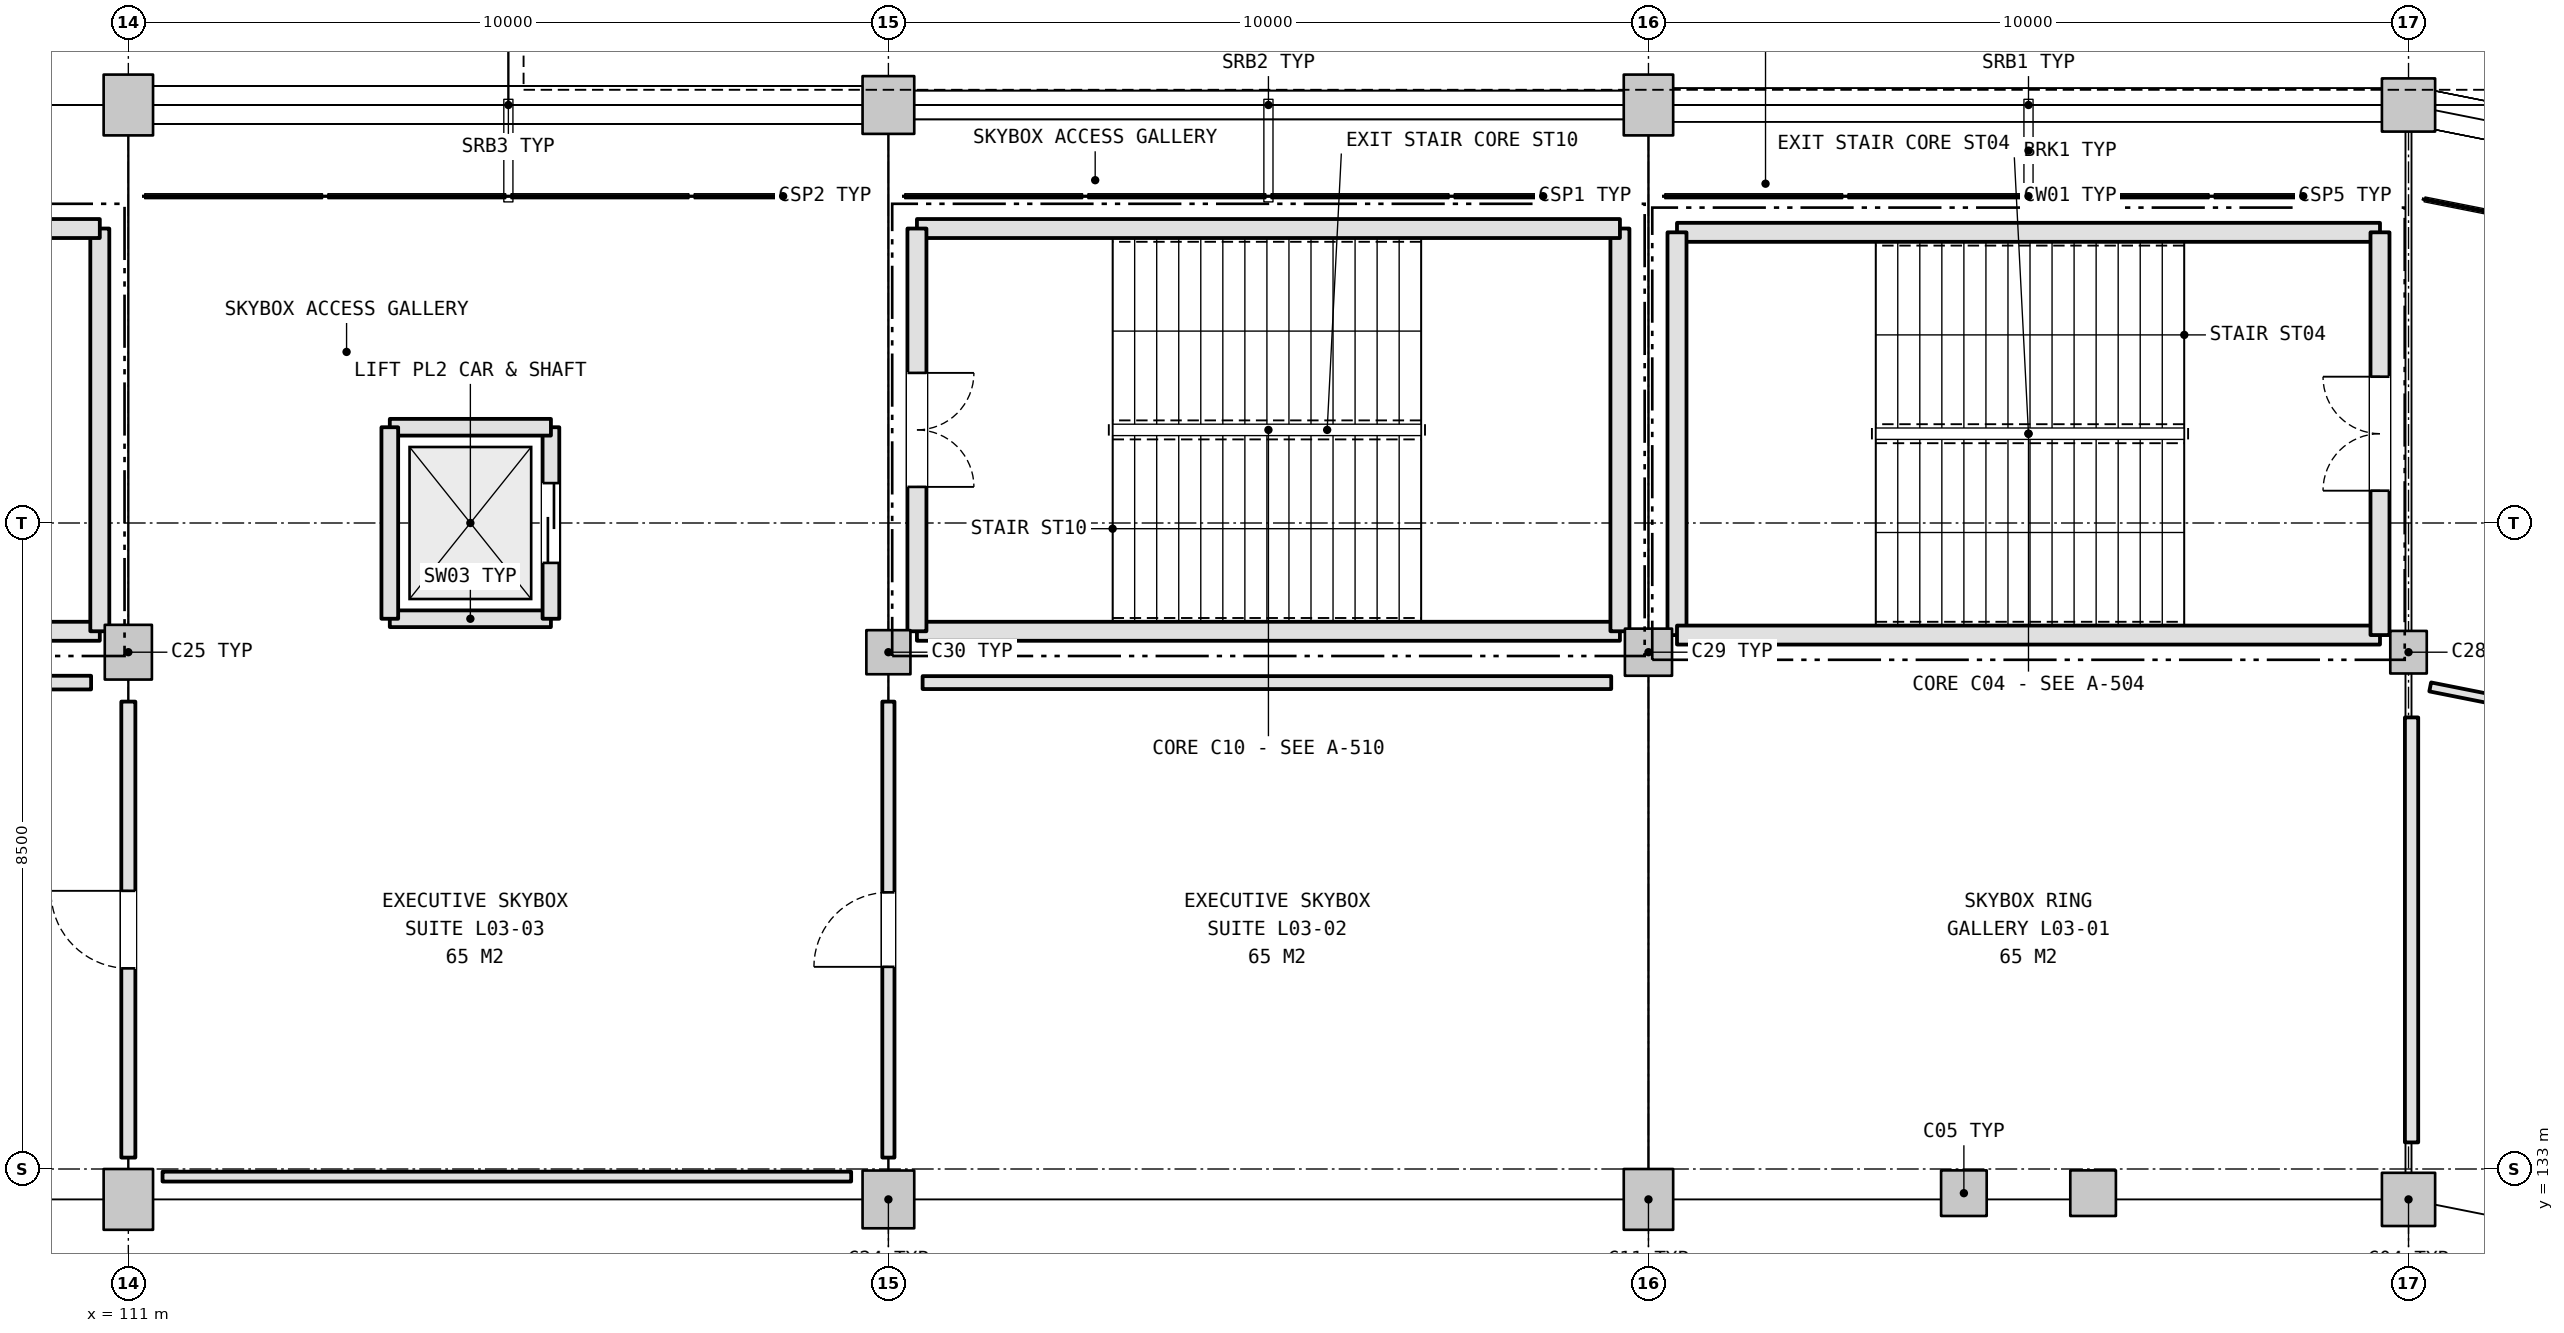
"""IFC4 building model, lengths in metres.
Left out: names, types, materials, properties, quantities, classifications, styles, units other than length and angle.
Written with IfcOpenShell. Run it as: python <this file> out.ifc"""

import sys

from ifc_helpers import new_model, si_unit, direction, frame, frame_2d, origin, origin_2d, place, context, subcontext, project, spatial, rectangle, extrude, element, fill, save


model = new_model("IFC4")
c1 = context("Model", 3, precision=1e-05, world=origin(), true_north=direction((0.0, 1.0)))
c2 = subcontext(c1, "Body", "Model", "MODEL_VIEW")
j1 = project(units=[si_unit("LENGTHUNIT", "METRE"), si_unit("PLANEANGLEUNIT", "RADIAN")], contexts=[c1])
p1 = place(None, origin())
s1 = spatial("IfcSite", under=j1, at=p1, CompositionType="ELEMENT")
p2 = place(p1, origin())
s2 = spatial("IfcBuilding", under=s1, at=p2, CompositionType="ELEMENT")
p3 = place(p2, frame((0.0, 0.0, 16.2)))
s3 = spatial("IfcBuildingStorey", under=s2, at=p3, CompositionType="ELEMENT", Elevation=16.2)
p4 = place(p3, frame((141.0, 132.6, 0.0), z_axis=(0.0, 0.0, 1.0), x_axis=(1.0, 0.0, 0.0)))
e1 = element("IfcColumn", 1, at=p4, inside=s3, PredefinedType="COLUMN", context=c2, shape_type="SweptSolid", body=[
    extrude(rectangle(XDim=0.7, YDim=0.7, at=origin_2d()), origin(), (0.0, 0.0, 1.0), 5.4),
])
p5 = place(p3, frame((141.0, 139.8, 0.0), z_axis=(0.0, 0.0, 1.0), x_axis=(1.0, 0.0, 0.0)))
e2 = element("IfcColumn", 2, at=p5, inside=s3, PredefinedType="COLUMN", context=c2, shape_type="SweptSolid", body=[
    extrude(rectangle(XDim=0.48, YDim=0.56, at=origin_2d()), origin(), (0.0, 0.0, 1.0), 5.4),
])
p6 = place(p3, frame((141.0, 147.0, 0.0), z_axis=(0.0, 0.0, 1.0), x_axis=(1.0, 0.0, 0.0)))
e3 = element("IfcColumn", 3, at=p6, inside=s3, PredefinedType="COLUMN", context=c2, shape_type="SweptSolid", body=[
    extrude(rectangle(XDim=0.7, YDim=0.7, at=origin_2d()), origin(), (0.0, 0.0, 1.0), 5.4),
])
p7 = place(p3, frame((131.0, 132.6, 0.0), z_axis=(0.0, 0.0, 1.0), x_axis=(1.0, 0.0, 0.0)))
e4 = element("IfcColumn", 4, at=p7, inside=s3, PredefinedType="COLUMN", context=c2, shape_type="SweptSolid", body=[
    extrude(rectangle(XDim=0.65, YDim=0.8, at=origin_2d()), origin(), (0.0, 0.0, 1.0), 5.4),
])
p8 = place(p3, frame((131.0, 139.8, 0.0), z_axis=(0.0, 0.0, 1.0), x_axis=(1.0, 0.0, 0.0)))
e5 = element("IfcColumn", 5, at=p8, inside=s3, PredefinedType="COLUMN", context=c2, shape_type="SweptSolid", body=[
    extrude(rectangle(XDim=0.62, YDim=0.62, at=origin_2d()), origin(), (0.0, 0.0, 1.0), 5.4),
])
p9 = place(p3, frame((131.0, 147.0, 0.0), z_axis=(0.0, 0.0, 1.0), x_axis=(1.0, 0.0, 0.0)))
e6 = element("IfcColumn", 6, at=p9, inside=s3, PredefinedType="COLUMN", context=c2, shape_type="SweptSolid", body=[
    extrude(rectangle(XDim=0.65, YDim=0.8, at=origin_2d()), origin(), (0.0, 0.0, 1.0), 5.4),
])
p10 = place(p3, frame((121.0, 132.6, 0.0), z_axis=(0.0, 0.0, 1.0), x_axis=(1.0, 0.0, 0.0)))
e7 = element("IfcColumn", 7, at=p10, inside=s3, PredefinedType="COLUMN", context=c2, shape_type="SweptSolid", body=[
    extrude(rectangle(XDim=0.68, YDim=0.76, at=origin_2d()), origin(), (0.0, 0.0, 1.0), 5.4),
])
p11 = place(p3, frame((121.0, 139.8, 0.0), z_axis=(0.0, 0.0, 1.0), x_axis=(1.0, 0.0, 0.0)))
e8 = element("IfcColumn", 8, at=p11, inside=s3, PredefinedType="COLUMN", context=c2, shape_type="SweptSolid", body=[
    extrude(rectangle(XDim=0.58, YDim=0.58, at=origin_2d()), origin(), (0.0, 0.0, 1.0), 5.4),
])
p12 = place(p3, frame((121.0, 147.0, 0.0), z_axis=(0.0, 0.0, 1.0), x_axis=(1.0, 0.0, 0.0)))
e9 = element("IfcColumn", 9, at=p12, inside=s3, PredefinedType="COLUMN", context=c2, shape_type="SweptSolid", body=[
    extrude(rectangle(XDim=0.68, YDim=0.76, at=origin_2d()), origin(), (0.0, 0.0, 1.0), 5.4),
])
p13 = place(p3, frame((111.0, 132.6, 0.0), z_axis=(0.0, 0.0, 1.0), x_axis=(1.0, 0.0, 0.0)))
e10 = element("IfcColumn", 10, at=p13, inside=s3, PredefinedType="COLUMN", context=c2, shape_type="SweptSolid", body=[
    extrude(rectangle(XDim=0.65, YDim=0.8, at=origin_2d()), origin(), (0.0, 0.0, 1.0), 5.4),
])
p14 = place(p3, frame((111.0, 139.8, 0.0), z_axis=(0.0, 0.0, 1.0), x_axis=(1.0, 0.0, 0.0)))
e11 = element("IfcColumn", 11, at=p14, inside=s3, PredefinedType="COLUMN", context=c2, shape_type="SweptSolid", body=[
    extrude(rectangle(XDim=0.62, YDim=0.72, at=origin_2d()), origin(), (0.0, 0.0, 1.0), 5.4),
])
p15 = place(p3, frame((111.0, 147.0, 0.0), z_axis=(0.0, 0.0, 1.0), x_axis=(1.0, 0.0, 0.0)))
e12 = element("IfcColumn", 12, at=p15, inside=s3, PredefinedType="COLUMN", context=c2, shape_type="SweptSolid", body=[
    extrude(rectangle(XDim=0.65, YDim=0.8, at=origin_2d()), origin(), (0.0, 0.0, 1.0), 5.4),
])
p16 = place(p3, frame((140.625, 145.325, 0.0), z_axis=(0.0, 0.0, 1.0), x_axis=(-1.0, 0.0, 0.0)))
e13 = element("IfcWall", 13, at=p16, inside=s3, PredefinedType="SHEAR", context=c2, shape_type="SweptSolid", body=[
    extrude(rectangle(XDim=9.249, YDim=0.25, at=frame_2d((4.625, 0.0))), origin(), (0.0, 0.0, 1.0), 5.14),
])
p17 = place(p3, frame((131.375, 145.325, 0.0), z_axis=(0.0, 0.0, 1.0), x_axis=(0.0, -1.0, 0.0)))
e14 = element("IfcWall", 14, at=p17, inside=s3, PredefinedType="SHEAR", context=c2, shape_type="SweptSolid", body=[
    extrude(rectangle(XDim=5.299, YDim=0.25, at=frame_2d((2.65, 0.0))), origin(), (0.0, 0.0, 1.0), 5.14),
])
p18 = place(p3, frame((131.375, 140.025, 0.0), z_axis=(0.0, 0.0, 1.0), x_axis=(1.0, 0.0, 0.0)))
e15 = element("IfcWall", 15, at=p18, inside=s3, PredefinedType="SHEAR", context=c2, shape_type="SweptSolid", body=[
    extrude(rectangle(XDim=9.249, YDim=0.25, at=frame_2d((4.625, 0.0))), origin(), (0.0, 0.0, 1.0), 5.14),
])
p19 = place(p3, frame((140.625, 140.025, 0.0), z_axis=(0.0, 0.0, 1.0), x_axis=(0.0, 1.0, 0.0)))
e16 = element("IfcWall", 16, at=p19, inside=s3, PredefinedType="SHEAR", context=c2, shape_type="SweptSolid", body=[
    extrude(rectangle(XDim=5.299, YDim=0.25, at=frame_2d((2.65, 0.0))), origin(), (0.0, 0.0, 1.0), 5.14),
])
p20 = place(p19, frame((1.9, 0.0, 0.0)))
e17 = element("IfcOpeningElement", 17, at=p20, cuts=e16, PredefinedType="OPENING", context=c2, shape_type="SweptSolid", body=[
    extrude(rectangle(XDim=1.5, YDim=2.2, at=frame_2d((0.75, 1.1))), frame((0.0, 0.135, 0.0), z_axis=(0.0, -1.0, 0.0), x_axis=(1.0, 0.0, 0.0)), (0.0, 0.0, 1.0), 0.27),
])
p21 = place(p3, frame((121.375, 140.075, 0.0), z_axis=(0.0, 0.0, 1.0), x_axis=(1.0, 0.0, 0.0)))
e18 = element("IfcWall", 18, at=p21, inside=s3, PredefinedType="SHEAR", context=c2, shape_type="SweptSolid", body=[
    extrude(rectangle(XDim=9.249, YDim=0.25, at=frame_2d((4.625, 0.0))), origin(), (0.0, 0.0, 1.0), 5.14),
])
p22 = place(p3, frame((130.625, 140.075, 0.0), z_axis=(0.0, 0.0, 1.0), x_axis=(0.0, 1.0, 0.0)))
e19 = element("IfcWall", 19, at=p22, inside=s3, PredefinedType="SHEAR", context=c2, shape_type="SweptSolid", body=[
    extrude(rectangle(XDim=5.299, YDim=0.25, at=frame_2d((2.649, 0.0))), origin(), (0.0, 0.0, 1.0), 5.14),
])
p23 = place(p3, frame((130.625, 145.375, 0.0), z_axis=(0.0, 0.0, 1.0), x_axis=(-1.0, 0.0, 0.0)))
e20 = element("IfcWall", 20, at=p23, inside=s3, PredefinedType="SHEAR", context=c2, shape_type="SweptSolid", body=[
    extrude(rectangle(XDim=9.249, YDim=0.25, at=frame_2d((4.625, 0.0))), origin(), (0.0, 0.0, 1.0), 5.14),
])
p24 = place(p3, frame((121.375, 145.375, 0.0), z_axis=(0.0, 0.0, 1.0), x_axis=(0.0, -1.0, 0.0)))
e21 = element("IfcWall", 21, at=p24, inside=s3, PredefinedType="SHEAR", context=c2, shape_type="SweptSolid", body=[
    extrude(rectangle(XDim=5.299, YDim=0.25, at=frame_2d((2.649, 0.0))), origin(), (0.0, 0.0, 1.0), 5.14),
])
p25 = place(p24, frame((1.9, 0.0, 0.0)))
e22 = element("IfcOpeningElement", 22, at=p25, cuts=e21, PredefinedType="OPENING", context=c2, shape_type="SweptSolid", body=[
    extrude(rectangle(XDim=1.5, YDim=2.2, at=frame_2d((0.75, 1.1))), frame((0.0, 0.135, 0.0), z_axis=(0.0, -1.0, 0.0), x_axis=(1.0, 0.0, 0.0)), (0.0, 0.0, 1.0), 0.27),
])
p26 = place(p3, frame((101.375, 140.075, 0.0), z_axis=(0.0, 0.0, 1.0), x_axis=(1.0, 0.0, 0.0)))
e23 = element("IfcWall", 23, at=p26, inside=s3, PredefinedType="SHEAR", context=c2, shape_type="SweptSolid", body=[
    extrude(rectangle(XDim=9.249, YDim=0.25, at=frame_2d((4.625, 0.0))), origin(), (0.0, 0.0, 1.0), 5.14),
])
p27 = place(p3, frame((110.625, 140.075, 0.0), z_axis=(0.0, 0.0, 1.0), x_axis=(0.0, 1.0, 0.0)))
e24 = element("IfcWall", 24, at=p27, inside=s3, PredefinedType="SHEAR", context=c2, shape_type="SweptSolid", body=[
    extrude(rectangle(XDim=5.299, YDim=0.25, at=frame_2d((2.649, 0.0))), origin(), (0.0, 0.0, 1.0), 5.14),
])
p28 = place(p3, frame((110.625, 145.375, 0.0), z_axis=(0.0, 0.0, 1.0), x_axis=(-1.0, 0.0, 0.0)))
e25 = element("IfcWall", 25, at=p28, inside=s3, PredefinedType="SHEAR", context=c2, shape_type="SweptSolid", body=[
    extrude(rectangle(XDim=9.249, YDim=0.25, at=frame_2d((4.625, 0.0))), origin(), (0.0, 0.0, 1.0), 5.14),
])
for number, where, z_axis, x_axis in (
    (26, (135.15, 132.682, 0.0), (0.0, 0.0, 1.0), (1.0, 0.0, 0.0)),
    (27, (136.85, 132.682, 0.0), (0.0, 0.0, 1.0), (1.0, 0.0, 0.0)),
):
    element("IfcColumn", number, at=place(p3, frame(where, z_axis=z_axis, x_axis=x_axis)), inside=s3, PredefinedType="COLUMN", context=c2, shape_type="SweptSolid", body=[
        extrude(rectangle(XDim=0.6, YDim=0.6, at=origin_2d()), origin(), (0.0, 0.0, 1.0), 5.4),
    ])
p29 = place(p3, frame((114.44, 140.24, 0.0), z_axis=(0.0, 0.0, 1.0), x_axis=(1.0, 0.0, 0.0)))
e28 = element("IfcWall", 28, at=p29, inside=s3, PredefinedType="SHEAR", context=c2, shape_type="SweptSolid", body=[
    extrude(rectangle(XDim=2.12, YDim=0.22, at=frame_2d((1.06, 0.0))), origin(), (0.0, 0.0, 1.0), 5.14),
])
p30 = place(p3, frame((116.56, 140.24, 0.0), z_axis=(0.0, 0.0, 1.0), x_axis=(0.0, 1.0, 0.0)))
e29 = element("IfcWall", 29, at=p30, inside=s3, PredefinedType="SHEAR", context=c2, shape_type="SweptSolid", body=[
    extrude(rectangle(XDim=2.52, YDim=0.22, at=frame_2d((1.26, 0.0))), origin(), (0.0, 0.0, 1.0), 5.14),
])
p31 = place(p30, frame((0.735, 0.0, 0.0)))
e30 = element("IfcOpeningElement", 30, at=p31, cuts=e29, PredefinedType="OPENING", context=c2, shape_type="SweptSolid", body=[
    extrude(rectangle(XDim=1.05, YDim=2.15, at=frame_2d((0.525, 1.075))), frame((0.0, 0.12, 0.0), z_axis=(0.0, -1.0, 0.0), x_axis=(1.0, 0.0, 0.0)), (0.0, 0.0, 1.0), 0.24),
])
p32 = place(p3, frame((116.56, 142.76, 0.0), z_axis=(0.0, 0.0, 1.0), x_axis=(-1.0, 0.0, 0.0)))
e31 = element("IfcWall", 31, at=p32, inside=s3, PredefinedType="SHEAR", context=c2, shape_type="SweptSolid", body=[
    extrude(rectangle(XDim=2.12, YDim=0.22, at=frame_2d((1.06, 0.0))), origin(), (0.0, 0.0, 1.0), 5.14),
])
p33 = place(p3, frame((114.44, 142.76, 0.0), z_axis=(0.0, 0.0, 1.0), x_axis=(0.0, -1.0, 0.0)))
e32 = element("IfcWall", 32, at=p33, inside=s3, PredefinedType="SHEAR", context=c2, shape_type="SweptSolid", body=[
    extrude(rectangle(XDim=2.52, YDim=0.22, at=frame_2d((1.26, 0.0))), origin(), (0.0, 0.0, 1.0), 5.14),
])
p34 = place(p3, frame((121.0, 133.15, 0.0), z_axis=(0.0, 0.0, 1.0), x_axis=(0.0, 1.0, 0.0)))
e33 = element("IfcWall", 33, at=p34, inside=s3, PredefinedType="PARTITIONING", context=c2, shape_type="SweptSolid", body=[
    extrude(rectangle(XDim=6.0, YDim=0.16, at=frame_2d((3.0, 0.0))), origin(), (0.0, 0.0, 1.0), 4.375),
])
p35 = place(p34, frame((2.51, 0.0, 0.0)))
e34 = element("IfcOpeningElement", 34, at=p35, cuts=e33, PredefinedType="OPENING", context=c2, shape_type="SweptSolid", body=[
    extrude(rectangle(XDim=0.98, YDim=2.15, at=frame_2d((0.49, 1.075))), frame((0.0, 0.09, 0.0), z_axis=(0.0, -1.0, 0.0), x_axis=(1.0, 0.0, 0.0)), (0.0, 0.0, 1.0), 0.18),
])
p36 = place(p3, frame((121.45, 139.4, 0.0), z_axis=(0.0, 0.0, 1.0), x_axis=(1.0, 0.0, 0.0)))
e35 = element("IfcWall", 35, at=p36, inside=s3, PredefinedType="PARTITIONING", context=c2, shape_type="SweptSolid", body=[
    extrude(rectangle(XDim=9.06, YDim=0.17, at=frame_2d((4.53, 0.0))), origin(), (0.0, 0.0, 1.0), 5.12),
])
p37 = place(p3, frame((111.0, 133.15, 0.0), z_axis=(0.0, 0.0, 1.0), x_axis=(0.0, 1.0, 0.0)))
e36 = element("IfcWall", 36, at=p37, inside=s3, PredefinedType="PARTITIONING", context=c2, shape_type="SweptSolid", body=[
    extrude(rectangle(XDim=6.0, YDim=0.185, at=frame_2d((3.0, 0.0))), origin(), (0.0, 0.0, 1.0), 4.365),
])
p38 = place(p37, frame((2.49, 0.0, 0.0)))
e37 = element("IfcOpeningElement", 37, at=p38, cuts=e36, PredefinedType="OPENING", context=c2, shape_type="SweptSolid", body=[
    extrude(rectangle(XDim=1.02, YDim=2.15, at=frame_2d((0.51, 1.075))), frame((0.0, 0.103, 0.0), z_axis=(0.0, -1.0, 0.0), x_axis=(1.0, 0.0, 0.0)), (0.0, 0.0, 1.0), 0.205),
])
p39 = place(p3, frame((120.51, 132.9, 0.0), z_axis=(0.0, 0.0, 1.0), x_axis=(-1.0, 0.0, 0.0)))
e38 = element("IfcWall", 38, at=p39, inside=s3, PredefinedType="PARTITIONING", context=c2, shape_type="SweptSolid", body=[
    extrude(rectangle(XDim=9.06, YDim=0.13, at=frame_2d((4.53, 0.0))), origin(), (0.0, 0.0, 1.0), 4.505),
])
p40 = place(p3, frame((101.45, 139.4, 0.0), z_axis=(0.0, 0.0, 1.0), x_axis=(1.0, 0.0, 0.0)))
e39 = element("IfcWall", 39, at=p40, inside=s3, PredefinedType="PARTITIONING", context=c2, shape_type="SweptSolid", body=[
    extrude(rectangle(XDim=9.06, YDim=0.18, at=frame_2d((4.53, 0.0))), origin(), (0.0, 0.0, 1.0), 5.12),
])
p41 = place(p3, frame((141.285, 139.343, 0.0), z_axis=(0.0, 0.0, 1.0), x_axis=(0.980784295226, -0.195095274771, 0.0)))
e40 = element("IfcWall", 40, at=p41, inside=s3, PredefinedType="PARTITIONING", context=c2, shape_type="SweptSolid", body=[
    extrude(rectangle(XDim=16.742, YDim=0.12, at=frame_2d((8.371, 0.0))), origin(), (0.0, 0.0, 1.0), 4.305),
])
p42 = place(p41, frame((7.596, 0.0, 0.0)))
e41 = element("IfcOpeningElement", 41, at=p42, cuts=e40, PredefinedType="OPENING", context=c2, shape_type="SweptSolid", body=[
    extrude(rectangle(XDim=1.55, YDim=2.15, at=frame_2d((0.775, 1.075))), frame((0.0, 0.07, 0.0), z_axis=(0.0, -1.0, 0.0), x_axis=(1.0, 0.0, 0.0)), (0.0, 0.0, 1.0), 0.14),
])
p43 = place(p3, frame((141.04, 133.35, 0.0), z_axis=(0.0, 0.0, 1.0), x_axis=(0.0, 1.0, 0.0)))
e42 = element("IfcWall", 42, at=p43, inside=s3, PredefinedType="PARTITIONING", context=c2, shape_type="SweptSolid", body=[
    extrude(rectangle(XDim=5.592, YDim=0.175, at=frame_2d((2.796, 0.0))), origin(), (0.0, 0.0, 1.0), 4.305),
])
p44 = place(p20, origin())
e43 = element("IfcDoor", 43, at=p44, inside=s3, OperationType="DOUBLE_DOOR_SINGLE_SWING", PredefinedType="DOOR", context=c2, shape_type="SweptSolid", body=[
    extrude(rectangle(XDim=1.5, YDim=2.2, at=frame_2d((0.75, 1.1))), frame((0.0, 0.025, 0.0), z_axis=(0.0, -1.0, 0.0), x_axis=(1.0, 0.0, 0.0)), (0.0, 0.0, 1.0), 0.05),
])
fill(e17, e43)
p45 = place(p25, origin())
e44 = element("IfcDoor", 44, at=p45, inside=s3, OperationType="DOUBLE_DOOR_SINGLE_SWING", PredefinedType="DOOR", context=c2, shape_type="SweptSolid", body=[
    extrude(rectangle(XDim=1.5, YDim=2.2, at=frame_2d((0.75, 1.1))), frame((0.0, 0.025, 0.0), z_axis=(0.0, -1.0, 0.0), x_axis=(1.0, 0.0, 0.0)), (0.0, 0.0, 1.0), 0.05),
])
fill(e22, e44)
p46 = place(p31, origin())
e45 = element("IfcDoor", 45, at=p46, inside=s3, OperationType="DOUBLE_DOOR_SLIDING", PredefinedType="DOOR", context=c2, shape_type="SweptSolid", body=[
    extrude(rectangle(XDim=1.05, YDim=2.15, at=frame_2d((0.525, 1.075))), frame((0.0, 0.025, 0.0), z_axis=(0.0, -1.0, 0.0), x_axis=(1.0, 0.0, 0.0)), (0.0, 0.0, 1.0), 0.05),
])
fill(e30, e45)
p47 = place(p35, origin())
e46 = element("IfcDoor", 46, at=p47, inside=s3, OperationType="SINGLE_SWING_LEFT", PredefinedType="DOOR", context=c2, shape_type="SweptSolid", body=[
    extrude(rectangle(XDim=0.98, YDim=2.15, at=frame_2d((0.49, 1.075))), frame((0.0, 0.025, 0.0), z_axis=(0.0, -1.0, 0.0), x_axis=(1.0, 0.0, 0.0)), (0.0, 0.0, 1.0), 0.05),
])
fill(e34, e46)
p48 = place(p38, origin())
e47 = element("IfcDoor", 47, at=p48, inside=s3, OperationType="SINGLE_SWING_RIGHT", PredefinedType="DOOR", context=c2, shape_type="SweptSolid", body=[
    extrude(rectangle(XDim=1.02, YDim=2.15, at=frame_2d((0.51, 1.075))), frame((0.0, 0.025, 0.0), z_axis=(0.0, -1.0, 0.0), x_axis=(1.0, 0.0, 0.0)), (0.0, 0.0, 1.0), 0.05),
])
fill(e37, e47)
save(model, sys.argv[1])
